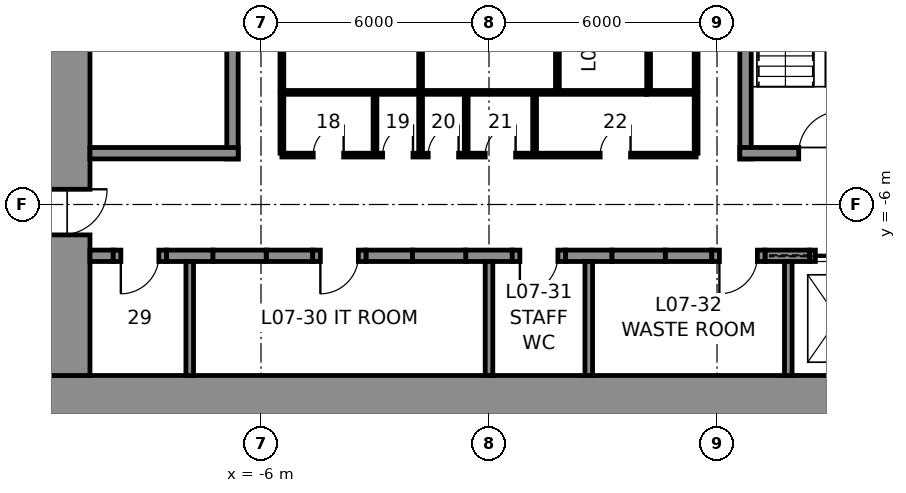
"""IFC4 building model, lengths in metres.
Left out: names, types, materials, properties, quantities, classifications, styles, units other than length and angle.
Written with IfcOpenShell. Run it as: python <this file> out.ifc"""

import sys

from ifc_helpers import new_model, si_unit, direction, frame, frame_2d, origin, place, context, subcontext, project, spatial, rectangle, extrude, element, fill, save


model = new_model("IFC4")
c1 = context("Model", 3, precision=1e-05, world=origin(), true_north=direction((0.0, 1.0)))
c2 = subcontext(c1, "Body", "Model", "MODEL_VIEW")
j1 = project(units=[si_unit("LENGTHUNIT", "METRE"), si_unit("PLANEANGLEUNIT", "RADIAN")], contexts=[c1])
p1 = place(None, origin())
s1 = spatial("IfcSite", under=j1, at=p1, CompositionType="ELEMENT")
p2 = place(p1, origin())
s2 = spatial("IfcBuilding", under=s1, at=p2, CompositionType="ELEMENT")
p3 = place(p2, frame((0.0, 0.0, 37.5)))
s3 = spatial("IfcBuildingStorey", under=s2, at=p3, CompositionType="ELEMENT", Elevation=37.5)
p4 = place(p3, frame((12.0, -11.25, 0.0), z_axis=(0.0, 0.0, 1.0), x_axis=(-1.0, 0.0, 0.0)))
e1 = element("IfcWall", 1, at=p4, inside=s3, PredefinedType="SHEAR", context=c2, shape_type="SweptSolid", body=[
    extrude(rectangle(XDim=24.0, YDim=1.5, at=frame_2d((12.0, 0.0))), origin(), (0.0, 0.0, 1.0), 5.5),
])
p5 = place(p3, frame((-11.25, -10.5, 0.0), z_axis=(0.0, 0.0, 1.0), x_axis=(0.0, 1.0, 0.0)))
e2 = element("IfcWall", 2, at=p5, inside=s3, PredefinedType="SHEAR", context=c2, shape_type="SweptSolid", body=[
    extrude(rectangle(XDim=21.0, YDim=1.5, at=frame_2d((10.5, 0.0))), origin(), (0.0, 0.0, 1.0), 5.5),
])
p6 = place(p5, frame((16.1, 0.0, 0.0)))
e3 = element("IfcOpeningElement", 3, at=p6, cuts=e2, PredefinedType="OPENING", context=c2, shape_type="SweptSolid", body=[
    extrude(rectangle(XDim=1.2, YDim=2.3, at=frame_2d((0.6, 1.15))), frame((0.0, 0.76, 0.0), z_axis=(0.0, -1.0, 0.0), x_axis=(1.0, 0.0, 0.0)), (0.0, 0.0, 1.0), 1.52),
])
p7 = place(p5, frame((3.7, 0.0, 0.0)))
e4 = element("IfcOpeningElement", 4, at=p7, cuts=e2, PredefinedType="OPENING", context=c2, shape_type="SweptSolid", body=[
    extrude(rectangle(XDim=1.2, YDim=2.3, at=frame_2d((0.6, 1.15))), frame((0.0, 0.76, 0.0), z_axis=(0.0, -1.0, 0.0), x_axis=(1.0, 0.0, 0.0)), (0.0, 0.0, 1.0), 1.52),
])
p8 = place(p3, frame((-10.5, -7.35, 0.0), z_axis=(0.0, 0.0, 1.0), x_axis=(1.0, 0.0, 0.0)))
e5 = element("IfcWall", 5, at=p8, inside=s3, PredefinedType="SHEAR", context=c2, shape_type="SweptSolid", body=[
    extrude(rectangle(XDim=0.613, YDim=0.3, at=frame_2d((0.306, 0.0))), origin(), (0.0, 0.0, 1.0), 5.5),
])
for number, where, z_axis, x_axis in (
    (6, (-8.488, -7.35, 0.0), (0.0, 0.0, 1.0), (1.0, 0.0, 0.0)),
    (7, (-5.863, -7.35, 0.0), (0.0, 0.0, 1.0), (1.0, 0.0, 0.0)),
    (8, (-3.238, -7.35, 0.0), (0.0, 0.0, 1.0), (1.0, 0.0, 0.0)),
    (9, (-0.613, -7.35, 0.0), (0.0, 0.0, 1.0), (1.0, 0.0, 0.0)),
    (10, (2.012, -7.35, 0.0), (0.0, 0.0, 1.0), (1.0, 0.0, 0.0)),
    (11, (4.637, -7.35, 0.0), (0.0, 0.0, 1.0), (1.0, 0.0, 0.0)),
):
    element("IfcWall", number, at=place(p3, frame(where, z_axis=z_axis, x_axis=x_axis)), inside=s3, PredefinedType="SHEAR", context=c2, shape_type="SweptSolid", body=[
        extrude(rectangle(XDim=1.225, YDim=0.3, at=frame_2d((0.613, 0.0))), origin(), (0.0, 0.0, 1.0), 5.5),
    ])
p9 = place(p3, frame((7.262, -7.35, 0.0), z_axis=(0.0, 0.0, 1.0), x_axis=(1.0, 0.0, 0.0)))
e12 = element("IfcWall", 12, at=p9, inside=s3, PredefinedType="SHEAR", context=c2, shape_type="SweptSolid", body=[
    extrude(rectangle(XDim=1.175, YDim=0.3, at=frame_2d((0.587, 0.0))), origin(), (0.0, 0.0, 1.0), 5.5),
])
p10 = place(p3, frame((-9.887, -7.35, 0.0), z_axis=(0.0, 0.0, 1.0), x_axis=(1.0, 0.0, 0.0)))
e13 = element("IfcWall", 13, at=p10, inside=s3, PredefinedType="PARTITIONING", context=c2, shape_type="SweptSolid", body=[
    extrude(rectangle(XDim=1.4, YDim=0.3, at=frame_2d((0.7, 0.0))), origin(), (0.0, 0.0, 1.0), 5.5),
])
p11 = place(p10, frame((0.2, 0.0, 0.0)))
e14 = element("IfcOpeningElement", 14, at=p11, cuts=e13, PredefinedType="OPENING", context=c2, shape_type="SweptSolid", body=[
    extrude(rectangle(XDim=1.0, YDim=2.3, at=frame_2d((0.5, 1.15))), frame((0.0, 0.16, 0.0), z_axis=(0.0, -1.0, 0.0), x_axis=(1.0, 0.0, 0.0)), (0.0, 0.0, 1.0), 0.32),
])
p12 = place(p3, frame((-7.262, -7.35, 0.0), z_axis=(0.0, 0.0, 1.0), x_axis=(1.0, 0.0, 0.0)))
e15 = element("IfcWall", 15, at=p12, inside=s3, PredefinedType="PARTITIONING", context=c2, shape_type="SweptSolid", body=[
    extrude(rectangle(XDim=1.4, YDim=0.3, at=frame_2d((0.7, 0.0))), origin(), (0.0, 0.0, 1.0), 5.5),
])
p13 = place(p3, frame((-4.637, -7.35, 0.0), z_axis=(0.0, 0.0, 1.0), x_axis=(1.0, 0.0, 0.0)))
e16 = element("IfcWall", 16, at=p13, inside=s3, PredefinedType="PARTITIONING", context=c2, shape_type="SweptSolid", body=[
    extrude(rectangle(XDim=1.4, YDim=0.3, at=frame_2d((0.7, 0.0))), origin(), (0.0, 0.0, 1.0), 5.5),
])
p14 = place(p13, frame((0.2, 0.0, 0.0)))
e17 = element("IfcOpeningElement", 17, at=p14, cuts=e16, PredefinedType="OPENING", context=c2, shape_type="SweptSolid", body=[
    extrude(rectangle(XDim=1.0, YDim=2.3, at=frame_2d((0.5, 1.15))), frame((0.0, 0.16, 0.0), z_axis=(0.0, -1.0, 0.0), x_axis=(1.0, 0.0, 0.0)), (0.0, 0.0, 1.0), 0.32),
])
p15 = place(p3, frame((-2.012, -7.35, 0.0), z_axis=(0.0, 0.0, 1.0), x_axis=(1.0, 0.0, 0.0)))
e18 = element("IfcWall", 18, at=p15, inside=s3, PredefinedType="PARTITIONING", context=c2, shape_type="SweptSolid", body=[
    extrude(rectangle(XDim=1.4, YDim=0.3, at=frame_2d((0.7, 0.0))), origin(), (0.0, 0.0, 1.0), 5.5),
])
p16 = place(p3, frame((0.613, -7.35, 0.0), z_axis=(0.0, 0.0, 1.0), x_axis=(1.0, 0.0, 0.0)))
e19 = element("IfcWall", 19, at=p16, inside=s3, PredefinedType="PARTITIONING", context=c2, shape_type="SweptSolid", body=[
    extrude(rectangle(XDim=1.4, YDim=0.3, at=frame_2d((0.7, 0.0))), origin(), (0.0, 0.0, 1.0), 5.5),
])
p17 = place(p16, frame((0.2, 0.0, 0.0)))
e20 = element("IfcOpeningElement", 20, at=p17, cuts=e19, PredefinedType="OPENING", context=c2, shape_type="SweptSolid", body=[
    extrude(rectangle(XDim=1.0, YDim=2.3, at=frame_2d((0.5, 1.15))), frame((0.0, 0.16, 0.0), z_axis=(0.0, -1.0, 0.0), x_axis=(1.0, 0.0, 0.0)), (0.0, 0.0, 1.0), 0.32),
])
p18 = place(p3, frame((3.238, -7.35, 0.0), z_axis=(0.0, 0.0, 1.0), x_axis=(1.0, 0.0, 0.0)))
e21 = element("IfcWall", 21, at=p18, inside=s3, PredefinedType="PARTITIONING", context=c2, shape_type="SweptSolid", body=[
    extrude(rectangle(XDim=1.4, YDim=0.3, at=frame_2d((0.7, 0.0))), origin(), (0.0, 0.0, 1.0), 5.5),
])
p19 = place(p3, frame((5.863, -7.35, 0.0), z_axis=(0.0, 0.0, 1.0), x_axis=(1.0, 0.0, 0.0)))
e22 = element("IfcWall", 22, at=p19, inside=s3, PredefinedType="PARTITIONING", context=c2, shape_type="SweptSolid", body=[
    extrude(rectangle(XDim=1.4, YDim=0.3, at=frame_2d((0.7, 0.0))), origin(), (0.0, 0.0, 1.0), 5.5),
])
p20 = place(p19, frame((0.2, 0.0, 0.0)))
e23 = element("IfcOpeningElement", 23, at=p20, cuts=e22, PredefinedType="OPENING", context=c2, shape_type="SweptSolid", body=[
    extrude(rectangle(XDim=1.0, YDim=2.3, at=frame_2d((0.5, 1.15))), frame((0.0, 0.16, 0.0), z_axis=(0.0, -1.0, 0.0), x_axis=(1.0, 0.0, 0.0)), (0.0, 0.0, 1.0), 0.32),
])
p21 = place(p3, frame((8.438, -7.35, 0.0), z_axis=(0.0, 0.0, 1.0), x_axis=(1.0, 0.0, 0.0)))
e24 = element("IfcWall", 24, at=p21, inside=s3, PredefinedType="PARTITIONING", context=c2, shape_type="SweptSolid", body=[
    extrude(rectangle(XDim=1.5, YDim=0.3, at=frame_2d((0.75, 0.0))), origin(), (0.0, 0.0, 1.0), 5.5),
])
p22 = place(p21, frame((0.15, 0.0, 0.0)))
e25 = element("IfcOpeningElement", 25, at=p22, cuts=e24, PredefinedType="OPENING", context=c2, shape_type="SweptSolid", body=[
    extrude(rectangle(XDim=1.2, YDim=2.3, at=frame_2d((0.6, 1.15))), frame((0.0, 0.16, 0.0), z_axis=(0.0, -1.0, 0.0), x_axis=(1.0, 0.0, 0.0)), (0.0, 0.0, 1.0), 0.32),
])
for number, where, z_axis, x_axis in (
    (26, (-7.875, -10.5, 0.0), (0.0, 0.0, 1.0), (0.0, 1.0, 0.0)),
    (27, (0.0, -10.5, 0.0), (0.0, 0.0, 1.0), (0.0, 1.0, 0.0)),
    (28, (2.625, -10.5, 0.0), (0.0, 0.0, 1.0), (0.0, 1.0, 0.0)),
    (29, (7.875, -10.5, 0.0), (0.0, 0.0, 1.0), (0.0, 1.0, 0.0)),
):
    element("IfcWall", number, at=place(p3, frame(where, z_axis=z_axis, x_axis=x_axis)), inside=s3, PredefinedType="PARTITIONING", context=c2, shape_type="SweptSolid", body=[
        extrude(rectangle(XDim=3.0, YDim=0.2, at=frame_2d((1.5, 0.0))), origin(), (0.0, 0.0, 1.0), 5.5),
    ])
p23 = place(p3, frame((-6.75, -4.8, 0.0), z_axis=(0.0, 0.0, 1.0), x_axis=(0.0, 1.0, 0.0)))
e30 = element("IfcWall", 30, at=p23, inside=s3, PredefinedType="SOLIDWALL", context=c2, shape_type="SweptSolid", body=[
    extrude(rectangle(XDim=9.6, YDim=0.3, at=frame_2d((4.8, 0.0))), origin(), (0.0, 0.0, 1.0), 5.25),
])
p24 = place(p3, frame((-6.6, -4.65, 0.0), z_axis=(0.0, 0.0, 1.0), x_axis=(-1.0, 0.0, 0.0)))
e31 = element("IfcWall", 31, at=p24, inside=s3, PredefinedType="SOLIDWALL", context=c2, shape_type="SweptSolid", body=[
    extrude(rectangle(XDim=3.9, YDim=0.3, at=frame_2d((1.95, 0.0))), origin(), (0.0, 0.0, 1.0), 5.25),
])
p25 = place(p3, frame((6.75, -4.8, 0.0), z_axis=(0.0, 0.0, 1.0), x_axis=(0.0, 1.0, 0.0)))
e32 = element("IfcWall", 32, at=p25, inside=s3, PredefinedType="SOLIDWALL", context=c2, shape_type="SweptSolid", body=[
    extrude(rectangle(XDim=9.6, YDim=0.3, at=frame_2d((4.8, 0.0))), origin(), (0.0, 0.0, 1.0), 5.25),
])
p26 = place(p3, frame((10.5, -4.65, 0.0), z_axis=(0.0, 0.0, 1.0), x_axis=(-1.0, 0.0, 0.0)))
e33 = element("IfcWall", 33, at=p26, inside=s3, PredefinedType="SOLIDWALL", context=c2, shape_type="SweptSolid", body=[
    extrude(rectangle(XDim=3.9, YDim=0.3, at=frame_2d((1.95, 0.0))), origin(), (0.0, 0.0, 1.0), 5.25),
])
p27 = place(p26, frame((1.25, 0.0, 0.0)))
e34 = element("IfcOpeningElement", 34, at=p27, cuts=e33, PredefinedType="OPENING", context=c2, shape_type="SweptSolid", body=[
    extrude(rectangle(XDim=1.1, YDim=2.3, at=frame_2d((0.55, 1.15))), frame((0.0, 0.16, 0.0), z_axis=(0.0, -1.0, 0.0), x_axis=(1.0, 0.0, 0.0)), (0.0, 0.0, 1.0), 0.32),
])
p28 = place(p3, frame((4.15, -3.05, 0.0), z_axis=(0.0, 0.0, 1.0), x_axis=(-1.0, 0.0, 0.0)))
e35 = element("IfcWall", 35, at=p28, inside=s3, PredefinedType="PARTITIONING", context=c2, shape_type="SweptSolid", body=[
    extrude(rectangle(XDim=9.6, YDim=0.1, at=frame_2d((4.8, 0.0))), origin(), (0.0, 0.0, 1.0), 5.25),
])
p29 = place(p3, frame((5.45, -3.05, 0.0), z_axis=(0.0, 0.0, 1.0), x_axis=(-1.0, 0.0, 0.0)))
e36 = element("IfcWall", 36, at=p29, inside=s3, PredefinedType="PARTITIONING", context=c2, shape_type="SweptSolid", body=[
    extrude(rectangle(XDim=1.3, YDim=0.1, at=frame_2d((0.65, 0.0))), origin(), (0.0, 0.0, 1.0), 5.25),
])
for number, where, z_axis, x_axis in (
    (37, (5.45, 3.0, 0.0), (0.0, 0.0, 1.0), (0.0, -1.0, 0.0)),
    (38, (-5.45, -3.0, 0.0), (0.0, 0.0, 1.0), (0.0, 1.0, 0.0)),
    (39, (-1.8, -3.0, 0.0), (0.0, 0.0, 1.0), (0.0, 1.0, 0.0)),
    (40, (1.8, -3.0, 0.0), (0.0, 0.0, 1.0), (0.0, 1.0, 0.0)),
    (41, (4.2, -3.0, 0.0), (0.0, 0.0, 1.0), (0.0, 1.0, 0.0)),
):
    element("IfcWall", number, at=place(p3, frame(where, z_axis=z_axis, x_axis=x_axis)), inside=s3, PredefinedType="PARTITIONING", context=c2, shape_type="SweptSolid", body=[
        extrude(rectangle(XDim=6.0, YDim=0.1, at=frame_2d((3.0, 0.0))), origin(), (0.0, 0.0, 1.0), 5.25),
    ])
p30 = place(p3, frame((5.45, -4.7, 0.0), z_axis=(0.0, 0.0, 1.0), x_axis=(-1.0, 0.0, 0.0)))
e42 = element("IfcWall", 42, at=p30, inside=s3, PredefinedType="PARTITIONING", context=c2, shape_type="SweptSolid", body=[
    extrude(rectangle(XDim=10.9, YDim=0.1, at=frame_2d((5.45, 0.0))), origin(), (0.0, 0.0, 1.0), 5.25),
])
p31 = place(p30, frame((9.275, 0.0, 0.0)))
e43 = element("IfcOpeningElement", 43, at=p31, cuts=e42, PredefinedType="OPENING", context=c2, shape_type="SweptSolid", body=[
    extrude(rectangle(XDim=0.8, YDim=2.3, at=frame_2d((0.4, 1.15))), frame((0.0, 0.06, 0.0), z_axis=(0.0, -1.0, 0.0), x_axis=(1.0, 0.0, 0.0)), (0.0, 0.0, 1.0), 0.12),
])
p32 = place(p30, frame((7.45, 0.0, 0.0)))
e44 = element("IfcOpeningElement", 44, at=p32, cuts=e42, PredefinedType="OPENING", context=c2, shape_type="SweptSolid", body=[
    extrude(rectangle(XDim=0.8, YDim=2.3, at=frame_2d((0.4, 1.15))), frame((0.0, 0.06, 0.0), z_axis=(0.0, -1.0, 0.0), x_axis=(1.0, 0.0, 0.0)), (0.0, 0.0, 1.0), 0.12),
])
p33 = place(p30, frame((6.25, 0.0, 0.0)))
e45 = element("IfcOpeningElement", 45, at=p33, cuts=e42, PredefinedType="OPENING", context=c2, shape_type="SweptSolid", body=[
    extrude(rectangle(XDim=0.8, YDim=2.3, at=frame_2d((0.4, 1.15))), frame((0.0, 0.06, 0.0), z_axis=(0.0, -1.0, 0.0), x_axis=(1.0, 0.0, 0.0)), (0.0, 0.0, 1.0), 0.12),
])
p34 = place(p30, frame((4.75, 0.0, 0.0)))
e46 = element("IfcOpeningElement", 46, at=p34, cuts=e42, PredefinedType="OPENING", context=c2, shape_type="SweptSolid", body=[
    extrude(rectangle(XDim=0.8, YDim=2.3, at=frame_2d((0.4, 1.15))), frame((0.0, 0.06, 0.0), z_axis=(0.0, -1.0, 0.0), x_axis=(1.0, 0.0, 0.0)), (0.0, 0.0, 1.0), 0.12),
])
p35 = place(p30, frame((1.725, 0.0, 0.0)))
e47 = element("IfcOpeningElement", 47, at=p35, cuts=e42, PredefinedType="OPENING", context=c2, shape_type="SweptSolid", body=[
    extrude(rectangle(XDim=0.8, YDim=2.3, at=frame_2d((0.4, 1.15))), frame((0.0, 0.06, 0.0), z_axis=(0.0, -1.0, 0.0), x_axis=(1.0, 0.0, 0.0)), (0.0, 0.0, 1.0), 0.12),
])
for number, where, z_axis, x_axis in (
    (48, (-5.45, -3.1, 0.0), (0.0, 0.0, 1.0), (0.0, -1.0, 0.0)),
    (49, (5.45, -3.1, 0.0), (0.0, 0.0, 1.0), (0.0, -1.0, 0.0)),
    (50, (-3.0, -3.1, 0.0), (0.0, 0.0, 1.0), (0.0, -1.0, 0.0)),
    (51, (-1.8, -3.1, 0.0), (0.0, 0.0, 1.0), (0.0, -1.0, 0.0)),
    (52, (-0.6, -3.1, 0.0), (0.0, 0.0, 1.0), (0.0, -1.0, 0.0)),
    (53, (1.2, -3.1, 0.0), (0.0, 0.0, 1.0), (0.0, -1.0, 0.0)),
):
    element("IfcWall", number, at=place(p3, frame(where, z_axis=z_axis, x_axis=x_axis)), inside=s3, PredefinedType="PARTITIONING", context=c2, shape_type="SweptSolid", body=[
        extrude(rectangle(XDim=1.55, YDim=0.1, at=frame_2d((0.775, 0.0))), origin(), (0.0, 0.0, 1.0), 5.25),
    ])
p36 = place(p27, frame((1.1, 0.0, 0.0), z_axis=(0.0, 0.0, 1.0), x_axis=(-1.0, 0.0, 0.0)))
e54 = element("IfcDoor", 54, at=p36, inside=s3, OperationType="SINGLE_SWING_RIGHT", PredefinedType="DOOR", context=c2, shape_type="SweptSolid", body=[
    extrude(rectangle(XDim=1.1, YDim=2.3, at=frame_2d((0.55, 1.15))), frame((0.0, 0.025, 0.0), z_axis=(0.0, -1.0, 0.0), x_axis=(1.0, 0.0, 0.0)), (0.0, 0.0, 1.0), 0.05),
])
fill(e34, e54)
p37 = place(p31, frame((0.8, 0.0, 0.0), z_axis=(0.0, 0.0, 1.0), x_axis=(-1.0, 0.0, 0.0)))
e55 = element("IfcDoor", 55, at=p37, inside=s3, OperationType="SINGLE_SWING_RIGHT", PredefinedType="DOOR", context=c2, shape_type="SweptSolid", body=[
    extrude(rectangle(XDim=0.8, YDim=2.3, at=frame_2d((0.4, 1.15))), frame((0.0, 0.025, 0.0), z_axis=(0.0, -1.0, 0.0), x_axis=(1.0, 0.0, 0.0)), (0.0, 0.0, 1.0), 0.05),
])
fill(e43, e55)
p38 = place(p32, frame((0.8, 0.0, 0.0), z_axis=(0.0, 0.0, 1.0), x_axis=(-1.0, 0.0, 0.0)))
e56 = element("IfcDoor", 56, at=p38, inside=s3, OperationType="SINGLE_SWING_RIGHT", PredefinedType="DOOR", context=c2, shape_type="SweptSolid", body=[
    extrude(rectangle(XDim=0.8, YDim=2.3, at=frame_2d((0.4, 1.15))), frame((0.0, 0.025, 0.0), z_axis=(0.0, -1.0, 0.0), x_axis=(1.0, 0.0, 0.0)), (0.0, 0.0, 1.0), 0.05),
])
fill(e44, e56)
p39 = place(p33, frame((0.8, 0.0, 0.0), z_axis=(0.0, 0.0, 1.0), x_axis=(-1.0, 0.0, 0.0)))
e57 = element("IfcDoor", 57, at=p39, inside=s3, OperationType="SINGLE_SWING_RIGHT", PredefinedType="DOOR", context=c2, shape_type="SweptSolid", body=[
    extrude(rectangle(XDim=0.8, YDim=2.3, at=frame_2d((0.4, 1.15))), frame((0.0, 0.025, 0.0), z_axis=(0.0, -1.0, 0.0), x_axis=(1.0, 0.0, 0.0)), (0.0, 0.0, 1.0), 0.05),
])
fill(e45, e57)
p40 = place(p34, frame((0.8, 0.0, 0.0), z_axis=(0.0, 0.0, 1.0), x_axis=(-1.0, 0.0, 0.0)))
e58 = element("IfcDoor", 58, at=p40, inside=s3, OperationType="SINGLE_SWING_RIGHT", PredefinedType="DOOR", context=c2, shape_type="SweptSolid", body=[
    extrude(rectangle(XDim=0.8, YDim=2.3, at=frame_2d((0.4, 1.15))), frame((0.0, 0.025, 0.0), z_axis=(0.0, -1.0, 0.0), x_axis=(1.0, 0.0, 0.0)), (0.0, 0.0, 1.0), 0.05),
])
fill(e46, e58)
p41 = place(p35, frame((0.8, 0.0, 0.0), z_axis=(0.0, 0.0, 1.0), x_axis=(-1.0, 0.0, 0.0)))
e59 = element("IfcDoor", 59, at=p41, inside=s3, OperationType="SINGLE_SWING_RIGHT", PredefinedType="DOOR", context=c2, shape_type="SweptSolid", body=[
    extrude(rectangle(XDim=0.8, YDim=2.3, at=frame_2d((0.4, 1.15))), frame((0.0, 0.025, 0.0), z_axis=(0.0, -1.0, 0.0), x_axis=(1.0, 0.0, 0.0)), (0.0, 0.0, 1.0), 0.05),
])
fill(e47, e59)
p42 = place(p11, frame((1.0, 0.0, 0.0), z_axis=(0.0, 0.0, 1.0), x_axis=(-1.0, 0.0, 0.0)))
e60 = element("IfcDoor", 60, at=p42, inside=s3, OperationType="SINGLE_SWING_RIGHT", PredefinedType="DOOR", context=c2, shape_type="SweptSolid", body=[
    extrude(rectangle(XDim=1.0, YDim=2.3, at=frame_2d((0.5, 1.15))), frame((0.0, 0.025, 0.0), z_axis=(0.0, -1.0, 0.0), x_axis=(1.0, 0.0, 0.0)), (0.0, 0.0, 1.0), 0.05),
])
fill(e14, e60)
p43 = place(p14, frame((1.0, 0.0, 0.0), z_axis=(0.0, 0.0, 1.0), x_axis=(-1.0, 0.0, 0.0)))
e61 = element("IfcDoor", 61, at=p43, inside=s3, OperationType="SINGLE_SWING_RIGHT", PredefinedType="DOOR", context=c2, shape_type="SweptSolid", body=[
    extrude(rectangle(XDim=1.0, YDim=2.3, at=frame_2d((0.5, 1.15))), frame((0.0, 0.025, 0.0), z_axis=(0.0, -1.0, 0.0), x_axis=(1.0, 0.0, 0.0)), (0.0, 0.0, 1.0), 0.05),
])
fill(e17, e61)
p44 = place(p17, frame((1.0, 0.0, 0.0), z_axis=(0.0, 0.0, 1.0), x_axis=(-1.0, 0.0, 0.0)))
e62 = element("IfcDoor", 62, at=p44, inside=s3, OperationType="SINGLE_SWING_RIGHT", PredefinedType="DOOR", context=c2, shape_type="SweptSolid", body=[
    extrude(rectangle(XDim=1.0, YDim=2.3, at=frame_2d((0.5, 1.15))), frame((0.0, 0.025, 0.0), z_axis=(0.0, -1.0, 0.0), x_axis=(1.0, 0.0, 0.0)), (0.0, 0.0, 1.0), 0.05),
])
fill(e20, e62)
p45 = place(p20, frame((1.0, 0.0, 0.0), z_axis=(0.0, 0.0, 1.0), x_axis=(-1.0, 0.0, 0.0)))
e63 = element("IfcDoor", 63, at=p45, inside=s3, OperationType="SINGLE_SWING_RIGHT", PredefinedType="DOOR", context=c2, shape_type="SweptSolid", body=[
    extrude(rectangle(XDim=1.0, YDim=2.3, at=frame_2d((0.5, 1.15))), frame((0.0, 0.025, 0.0), z_axis=(0.0, -1.0, 0.0), x_axis=(1.0, 0.0, 0.0)), (0.0, 0.0, 1.0), 0.05),
])
fill(e23, e63)
p46 = place(p7, frame((1.2, 0.0, 0.0), z_axis=(0.0, 0.0, 1.0), x_axis=(-1.0, 0.0, 0.0)))
e64 = element("IfcDoor", 64, at=p46, inside=s3, OperationType="SINGLE_SWING_LEFT", PredefinedType="DOOR", context=c2, shape_type="SweptSolid", body=[
    extrude(rectangle(XDim=1.2, YDim=2.3, at=frame_2d((0.6, 1.15))), frame((0.0, 0.025, 0.0), z_axis=(0.0, -1.0, 0.0), x_axis=(1.0, 0.0, 0.0)), (0.0, 0.0, 1.0), 0.05),
])
fill(e4, e64)
p47 = place(p22, origin())
e65 = element("IfcDoor", 65, at=p47, inside=s3, OperationType="SLIDING_TO_LEFT", PredefinedType="DOOR", context=c2, shape_type="SweptSolid", body=[
    extrude(rectangle(XDim=1.2, YDim=2.3, at=frame_2d((0.6, 1.15))), frame((0.0, 0.025, 0.0), z_axis=(0.0, -1.0, 0.0), x_axis=(1.0, 0.0, 0.0)), (0.0, 0.0, 1.0), 0.05),
])
fill(e25, e65)
save(model, sys.argv[1])
